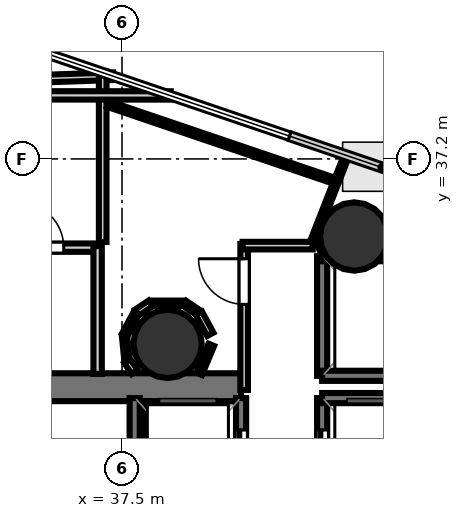
"""IFC4 building model, lengths in metres.
Left out: names, types, materials, properties, quantities, classifications, styles, units other than length and angle.
Written with IfcOpenShell. Run it as: python <this file> out.ifc"""

import sys

from ifc_helpers import new_model, si_unit, direction, frame, frame_2d, origin, origin_2d, place, context, subcontext, project, spatial, rectangle, hollow_circle, extrude, element, fill, save


model = new_model("IFC4")
c1 = context("Model", 3, precision=1e-05, world=origin(), true_north=direction((0.0, 1.0)))
c2 = subcontext(c1, "Body", "Model", "MODEL_VIEW")
j1 = project(units=[si_unit("LENGTHUNIT", "METRE"), si_unit("PLANEANGLEUNIT", "RADIAN")], contexts=[c1])
p1 = place(None, origin())
s1 = spatial("IfcSite", under=j1, at=p1, CompositionType="ELEMENT")
p2 = place(p1, origin())
s2 = spatial("IfcBuilding", under=s1, at=p2, CompositionType="ELEMENT")
p3 = place(p2, frame((0.0, 0.0, 169.8)))
s3 = spatial("IfcBuildingStorey", under=s2, at=p3, CompositionType="ELEMENT", Elevation=169.8)
p4 = place(p3, frame((29.23, 32.695, 0.0), z_axis=(0.0, 0.0, 1.0), x_axis=(1.0, 0.0, 0.0)))
e1 = element("IfcWall", 1, at=p4, inside=s3, PredefinedType="SHEAR", context=c2, shape_type="SweptSolid", body=[
    extrude(rectangle(XDim=10.62, YDim=0.55, at=frame_2d((5.31, 0.0))), origin(), (0.0, 0.0, 1.0), 3.52),
])
p5 = place(p4, frame((0.995, 0.0, 0.0)))
e2 = element("IfcOpeningElement", 2, at=p5, cuts=e1, PredefinedType="OPENING", context=c2, shape_type="SweptSolid", body=[
    extrude(rectangle(XDim=1.25, YDim=2.15, at=frame_2d((0.625, 1.075))), frame((0.0, 0.285, 0.0), z_axis=(0.0, -1.0, 0.0), x_axis=(1.0, 0.0, 0.0)), (0.0, 0.0, 1.0), 0.57),
])
p6 = place(p3, frame((38.18, 24.98, 0.0), z_axis=(0.0, 0.0, 1.0), x_axis=(0.0, 1.0, 0.0)))
e3 = element("IfcWall", 3, at=p6, inside=s3, PredefinedType="SHEAR", context=c2, shape_type="SweptSolid", body=[
    extrude(rectangle(XDim=7.44, YDim=0.5, at=frame_2d((3.72, 0.0))), origin(), (0.0, 0.0, 1.0), 3.52),
])
for number, where, z_axis, x_axis in (
    (4, (38.4, 33.55, 0.0), (0.0, 0.0, 1.0), (1.0, 0.0, 0.0)),
    (5, (42.083, 35.669, 0.0), (0.0, 0.0, 1.0), (1.0, 0.0, 0.0)),
):
    element("IfcColumn", number, at=place(p3, frame(where, z_axis=z_axis, x_axis=x_axis)), inside=s3, PredefinedType="COLUMN", context=c2, shape_type="SweptSolid", body=[
        extrude(hollow_circle(Radius=0.675, WallThickness=0.032, at=origin_2d()), origin(), (0.0, 0.0, 1.0), 3.7),
    ])
p7 = place(p3, frame((39.85, 30.12, 0.0), z_axis=(0.0, 0.0, 1.0), x_axis=(0.0, 1.0, 0.0)))
e6 = element("IfcWall", 6, at=p7, inside=s3, PredefinedType="SOLIDWALL", context=c2, shape_type="SweptSolid", body=[
    extrude(rectangle(XDim=2.36, YDim=0.2, at=frame_2d((1.18, 0.0))), origin(), (0.0, 0.0, 1.0), 3.52),
])
p8 = place(p7, frame((0.63, 0.0, 0.0)))
e7 = element("IfcOpeningElement", 7, at=p8, cuts=e6, PredefinedType="OPENING", context=c2, shape_type="SweptSolid", body=[
    extrude(rectangle(XDim=1.1, YDim=2.15, at=frame_2d((0.55, 1.075))), frame((0.0, 0.11, 0.0), z_axis=(0.0, -1.0, 0.0), x_axis=(1.0, 0.0, 0.0)), (0.0, 0.0, 1.0), 0.22),
])
p9 = place(p3, frame((37.75, 30.12, 0.0), z_axis=(0.0, 0.0, 1.0), x_axis=(0.0, 1.0, 0.0)))
e8 = element("IfcWall", 8, at=p9, inside=s3, PredefinedType="SOLIDWALL", context=c2, shape_type="SweptSolid", body=[
    extrude(rectangle(XDim=2.36, YDim=0.2, at=frame_2d((1.18, 0.0))), origin(), (0.0, 0.0, 1.0), 3.52),
])
p10 = place(p3, frame((41.45, 30.12, 0.0), z_axis=(0.0, 0.0, 1.0), x_axis=(0.0, 1.0, 0.0)))
e9 = element("IfcWall", 9, at=p10, inside=s3, PredefinedType="SOLIDWALL", context=c2, shape_type="SweptSolid", body=[
    extrude(rectangle(XDim=2.36, YDim=0.2, at=frame_2d((1.18, 0.0))), origin(), (0.0, 0.0, 1.0), 3.52),
])
p11 = place(p10, frame((0.63, 0.0, 0.0)))
e10 = element("IfcOpeningElement", 10, at=p11, cuts=e9, PredefinedType="OPENING", context=c2, shape_type="SweptSolid", body=[
    extrude(rectangle(XDim=1.1, YDim=2.15, at=frame_2d((0.55, 1.075))), frame((0.0, 0.11, 0.0), z_axis=(0.0, -1.0, 0.0), x_axis=(1.0, 0.0, 0.0)), (0.0, 0.0, 1.0), 0.22),
])
p12 = place(p3, frame((41.45, 32.48, 0.0), z_axis=(0.0, 0.0, 1.0), x_axis=(1.0, 0.0, 0.0)))
e11 = element("IfcWall", 11, at=p12, inside=s3, PredefinedType="SOLIDWALL", context=c2, shape_type="SweptSolid", body=[
    extrude(rectangle(XDim=2.1, YDim=0.2, at=frame_2d((1.05, 0.0))), origin(), (0.0, 0.0, 1.0), 3.52),
])
p13 = place(p3, frame((41.45, 32.92, 0.0), z_axis=(0.0, 0.0, 1.0), x_axis=(0.0, 1.0, 0.0)))
e12 = element("IfcWall", 12, at=p13, inside=s3, PredefinedType="SOLIDWALL", context=c2, shape_type="SweptSolid", body=[
    extrude(rectangle(XDim=2.36, YDim=0.2, at=frame_2d((1.18, 0.0))), origin(), (0.0, 0.0, 1.0), 3.52),
])
for number, where, z_axis, x_axis in (
    (13, (41.45, 35.28, 0.0), (0.0, 0.0, 1.0), (1.0, 0.0, 0.0)),
    (14, (41.45, 32.92, 0.0), (0.0, 0.0, 1.0), (1.0, 0.0, 0.0)),
):
    element("IfcWall", number, at=place(p3, frame(where, z_axis=z_axis, x_axis=x_axis)), inside=s3, PredefinedType="SOLIDWALL", context=c2, shape_type="SweptSolid", body=[
        extrude(rectangle(XDim=2.1, YDim=0.2, at=frame_2d((1.05, 0.0))), origin(), (0.0, 0.0, 1.0), 3.52),
    ])
p14 = place(p3, frame((39.911, 32.64, 0.0), z_axis=(0.0, 0.0, 1.0), x_axis=(0.0, 1.0, 0.0)))
e15 = element("IfcWall", 15, at=p14, inside=s3, PredefinedType="PARTITIONING", context=c2, shape_type="SweptSolid", body=[
    extrude(rectangle(XDim=2.88, YDim=0.15, at=frame_2d((1.44, 0.0))), origin(), (0.0, 0.0, 1.0), 2.84),
])
p15 = place(p14, frame((1.69, 0.0, 0.0)))
e16 = element("IfcOpeningElement", 16, at=p15, cuts=e15, PredefinedType="OPENING", context=c2, shape_type="SweptSolid", body=[
    extrude(rectangle(XDim=0.9, YDim=2.1, at=frame_2d((0.45, 1.05))), frame((0.0, 0.085, 0.0), z_axis=(0.0, -1.0, 0.0), x_axis=(1.0, 0.0, 0.0)), (0.0, 0.0, 1.0), 0.17),
])
p16 = place(p3, frame((39.88, 35.489, 0.0), z_axis=(0.0, 0.0, 1.0), x_axis=(1.0, 0.0, 0.0)))
e17 = element("IfcWall", 17, at=p16, inside=s3, PredefinedType="PARTITIONING", context=c2, shape_type="SweptSolid", body=[
    extrude(rectangle(XDim=1.383, YDim=0.15, at=frame_2d((0.691, 0.0))), origin(), (0.0, 0.0, 1.0), 2.84),
])
p17 = place(p3, frame((34.75, 35.449, 0.0), z_axis=(0.0, 0.0, 1.0), x_axis=(1.0, 0.0, 0.0)))
e18 = element("IfcWall", 18, at=p17, inside=s3, PredefinedType="PLUMBINGWALL", context=c2, shape_type="SweptSolid", body=[
    extrude(rectangle(XDim=2.3, YDim=0.165, at=frame_2d((1.15, 0.0))), origin(), (0.0, 0.0, 1.0), 2.84),
])
p18 = place(p17, frame((0.7, 0.0, 0.0)))
e19 = element("IfcOpeningElement", 19, at=p18, cuts=e18, PredefinedType="OPENING", context=c2, shape_type="SweptSolid", body=[
    extrude(rectangle(XDim=0.9, YDim=2.1, at=frame_2d((0.45, 1.05))), frame((0.0, 0.093, 0.0), z_axis=(0.0, -1.0, 0.0), x_axis=(1.0, 0.0, 0.0)), (0.0, 0.0, 1.0), 0.185),
])
p19 = place(p3, frame((37.019, 35.48, 0.0), z_axis=(0.0, 0.0, 1.0), x_axis=(0.0, -1.0, 0.0)))
e20 = element("IfcWall", 20, at=p19, inside=s3, PredefinedType="PLUMBINGWALL", context=c2, shape_type="SweptSolid", body=[
    extrude(rectangle(XDim=2.522, YDim=0.165, at=frame_2d((1.261, 0.0))), origin(), (0.0, 0.0, 1.0), 2.84),
])
p20 = place(p3, frame((22.349, 38.32, 0.0), z_axis=(0.0, 0.0, 1.0), x_axis=(0.999416305401, 0.03416209155, 0.0)))
e21 = element("IfcWall", 21, at=p20, inside=s3, PredefinedType="PARTITIONING", context=c2, shape_type="SweptSolid", body=[
    extrude(rectangle(XDim=14.986, YDim=0.15, at=frame_2d((7.493, 0.0))), origin(), (0.0, 0.0, 1.0), 2.84),
])
p21 = place(p20, frame((9.699, 0.0, 0.0)))
e22 = element("IfcOpeningElement", 22, at=p21, cuts=e21, PredefinedType="OPENING", context=c2, shape_type="SweptSolid", body=[
    extrude(rectangle(XDim=0.9, YDim=2.1, at=frame_2d((0.45, 1.05))), frame((0.0, 0.085, 0.0), z_axis=(0.0, -1.0, 0.0), x_axis=(1.0, 0.0, 0.0)), (0.0, 0.0, 1.0), 0.17),
])
p22 = place(p3, frame((37.119, 38.922, 0.0), z_axis=(0.0, 0.0, 1.0), x_axis=(0.0, -1.0, 0.0)))
e23 = element("IfcWall", 23, at=p22, inside=s3, PredefinedType="PARTITIONING", context=c2, shape_type="SweptSolid", body=[
    extrude(rectangle(XDim=3.362, YDim=0.15, at=frame_2d((1.681, 0.0))), origin(), (0.0, 0.0, 1.0), 2.84),
])
p23 = place(p3, frame((43.969, 36.576, 0.0), z_axis=(0.0, 0.0, 1.0), x_axis=(-0.919028863482, -0.394190243521, 0.0)))
e24 = element("IfcWall", 24, at=p23, inside=s3, PredefinedType="PARTITIONING", context=c2, shape_type="SweptSolid", body=[
    extrude(rectangle(XDim=2.827, YDim=0.12, at=frame_2d((1.414, 0.0))), origin(), (0.0, 0.0, 1.0), 2.84),
])
p24 = place(p3, frame((41.273, 35.589, 0.0), z_axis=(0.0, 0.0, 1.0), x_axis=(0.365105724435, 0.930966062746, 0.0)))
e25 = element("IfcWall", 25, at=p24, inside=s3, PredefinedType="PARTITIONING", context=c2, shape_type="SweptSolid", body=[
    extrude(rectangle(XDim=1.824, YDim=0.105, at=frame_2d((0.912, 0.0))), origin(), (0.0, 0.0, 1.0), 2.84),
])
p25 = place(p3, frame((39.243, 33.738, 0.0), z_axis=(0.0, 0.0, 1.0), x_axis=(-0.475420071565, 0.879758918996, 0.0)))
e26 = element("IfcWall", 26, at=p25, inside=s3, PredefinedType="PARTITIONING", context=c2, shape_type="SweptSolid", body=[
    extrude(rectangle(XDim=0.474, YDim=0.14, at=frame_2d((0.237, 0.0))), origin(), (0.0, 0.0, 1.0), 2.84),
])
p26 = place(p3, frame((39.008, 34.166, 0.0), z_axis=(0.0, 0.0, 1.0), x_axis=(-0.83170430964, 0.555218822922, 0.0)))
e27 = element("IfcWall", 27, at=p26, inside=s3, PredefinedType="PARTITIONING", context=c2, shape_type="SweptSolid", body=[
    extrude(rectangle(XDim=0.326, YDim=0.12, at=frame_2d((0.163, 0.0))), origin(), (0.0, 0.0, 1.0), 2.84),
])
p27 = place(p3, frame((38.719, 34.352, 0.0), z_axis=(0.0, 0.0, 1.0), x_axis=(-1.0, 0.0, 0.0)))
e28 = element("IfcWall", 28, at=p27, inside=s3, PredefinedType="PARTITIONING", context=c2, shape_type="SweptSolid", body=[
    extrude(rectangle(XDim=0.639, YDim=0.105, at=frame_2d((0.319, 0.0))), origin(), (0.0, 0.0, 1.0), 2.84),
])
p28 = place(p3, frame((38.063, 34.347, 0.0), z_axis=(0.0, 0.0, 1.0), x_axis=(-0.83170430964, -0.555218822922, 0.0)))
e29 = element("IfcWall", 29, at=p28, inside=s3, PredefinedType="PARTITIONING", context=c2, shape_type="SweptSolid", body=[
    extrude(rectangle(XDim=0.326, YDim=0.14, at=frame_2d((0.163, 0.0))), origin(), (0.0, 0.0, 1.0), 2.84),
])
p29 = place(p3, frame((37.782, 34.155, 0.0), z_axis=(0.0, 0.0, 1.0), x_axis=(-0.471424550379, -0.88190639713, 0.0)))
e30 = element("IfcWall", 30, at=p29, inside=s3, PredefinedType="PARTITIONING", context=c2, shape_type="SweptSolid", body=[
    extrude(rectangle(XDim=0.485, YDim=0.12, at=frame_2d((0.242, 0.0))), origin(), (0.0, 0.0, 1.0), 2.84),
])
p30 = place(p3, frame((37.55, 33.71, 0.0), z_axis=(0.0, 0.0, 1.0), x_axis=(0.097659413047, -0.995219894819, 0.0)))
e31 = element("IfcWall", 31, at=p30, inside=s3, PredefinedType="PARTITIONING", context=c2, shape_type="SweptSolid", body=[
    extrude(rectangle(XDim=0.485, YDim=0.105, at=frame_2d((0.242, 0.0))), origin(), (0.0, 0.0, 1.0), 2.84),
])
p31 = place(p3, frame((37.603, 33.213, 0.0), z_axis=(0.0, 0.0, 1.0), x_axis=(0.555554602959, -0.831480055762, 0.0)))
e32 = element("IfcWall", 32, at=p31, inside=s3, PredefinedType="PARTITIONING", context=c2, shape_type="SweptSolid", body=[
    extrude(rectangle(XDim=0.264, YDim=0.14, at=frame_2d((0.132, 0.0))), origin(), (0.0, 0.0, 1.0), 2.84),
])
p32 = place(p3, frame((39.023, 32.958, 0.0), z_axis=(0.0, 0.0, 1.0), x_axis=(0.385702795868, 0.922623082987, 0.0)))
e33 = element("IfcWall", 33, at=p32, inside=s3, PredefinedType="PARTITIONING", context=c2, shape_type="SweptSolid", body=[
    extrude(rectangle(XDim=0.622, YDim=0.12, at=frame_2d((0.311, 0.0))), origin(), (0.0, 0.0, 1.0), 2.84),
])
p33 = place(p3, frame((37.22, 38.286, 0.0), z_axis=(0.0, 0.0, 1.0), x_axis=(0.946917915535, -0.321475444224, 0.0)))
e34 = element("IfcWall", 34, at=p33, inside=s3, PredefinedType="PARTITIONING", context=c2, shape_type="SweptSolid", body=[
    extrude(rectangle(XDim=4.671, YDim=0.12, at=frame_2d((2.336, 0.0))), origin(), (0.0, 0.0, 1.0), 2.84),
])
p34 = place(p3, frame((38.463, 38.453, 0.0), z_axis=(0.0, 0.0, 1.0), x_axis=(-0.999999835954, 0.000572792269, 0.0)))
e35 = element("IfcWall", 35, at=p34, inside=s3, PredefinedType="PLUMBINGWALL", context=c2, shape_type="SweptSolid", body=[
    extrude(rectangle(XDim=5.115, YDim=0.165, at=frame_2d((2.557, 0.0))), origin(), (0.0, 0.0, 1.0), 2.84),
])
p35 = place(p8, origin())
e36 = element("IfcDoor", 36, at=p35, inside=s3, OperationType="SLIDING_TO_LEFT", PredefinedType="DOOR", context=c2, shape_type="SweptSolid", body=[
    extrude(rectangle(XDim=1.1, YDim=2.15, at=frame_2d((0.55, 1.075))), frame((0.0, 0.025, 0.0), z_axis=(0.0, -1.0, 0.0), x_axis=(1.0, 0.0, 0.0)), (0.0, 0.0, 1.0), 0.05),
])
fill(e7, e36)
p36 = place(p11, origin())
e37 = element("IfcDoor", 37, at=p36, inside=s3, OperationType="SLIDING_TO_LEFT", PredefinedType="DOOR", context=c2, shape_type="SweptSolid", body=[
    extrude(rectangle(XDim=1.1, YDim=2.15, at=frame_2d((0.55, 1.075))), frame((0.0, 0.025, 0.0), z_axis=(0.0, -1.0, 0.0), x_axis=(1.0, 0.0, 0.0)), (0.0, 0.0, 1.0), 0.05),
])
fill(e10, e37)
p37 = place(p18, origin())
e38 = element("IfcDoor", 38, at=p37, inside=s3, OperationType="SINGLE_SWING_LEFT", PredefinedType="DOOR", context=c2, shape_type="SweptSolid", body=[
    extrude(rectangle(XDim=0.9, YDim=2.1, at=frame_2d((0.45, 1.05))), frame((0.0, 0.025, 0.0), z_axis=(0.0, -1.0, 0.0), x_axis=(1.0, 0.0, 0.0)), (0.0, 0.0, 1.0), 0.05),
])
fill(e19, e38)
p38 = place(p15, origin())
e39 = element("IfcDoor", 39, at=p38, inside=s3, OperationType="SINGLE_SWING_RIGHT", PredefinedType="DOOR", context=c2, shape_type="SweptSolid", body=[
    extrude(rectangle(XDim=0.9, YDim=2.1, at=frame_2d((0.45, 1.05))), frame((0.0, 0.025, 0.0), z_axis=(0.0, -1.0, 0.0), x_axis=(1.0, 0.0, 0.0)), (0.0, 0.0, 1.0), 0.05),
])
fill(e16, e39)
save(model, sys.argv[1])
